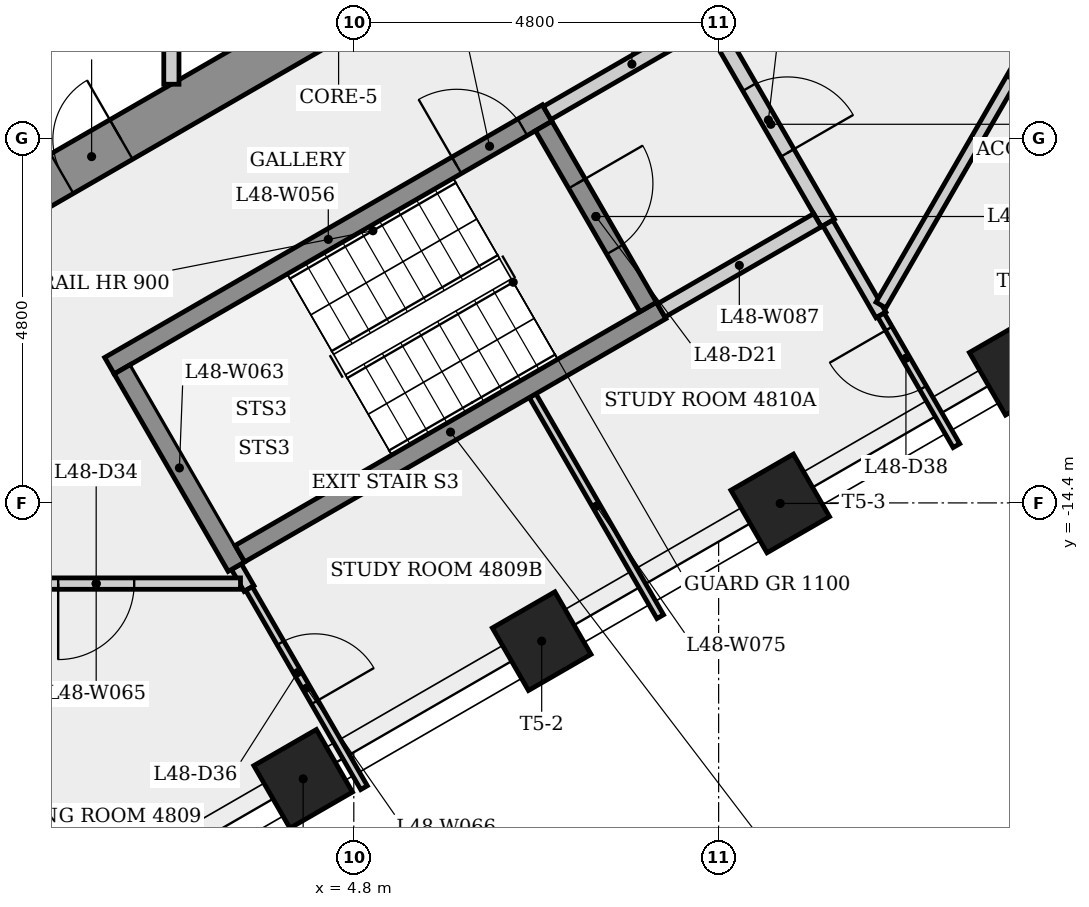
"""IFC4 building model, lengths in metres.
Left out: names, types, materials, properties, quantities, classifications, styles, units other than length and angle.
Written with IfcOpenShell. Run it as: python <this file> out.ifc"""

import sys

from ifc_helpers import new_model, si_unit, direction, frame, frame_2d, origin, origin_2d, place, context, subcontext, project, spatial, rectangle, extrude, element, fill, save


model = new_model("IFC4")
c1 = context("Model", 3, precision=1e-05, world=origin(), true_north=direction((0.0, 1.0)))
c2 = subcontext(c1, "Body", "Model", "MODEL_VIEW")
j1 = project(units=[si_unit("LENGTHUNIT", "METRE"), si_unit("PLANEANGLEUNIT", "RADIAN")], contexts=[c1])
p1 = place(None, origin())
s1 = spatial("IfcSite", under=j1, at=p1, CompositionType="ELEMENT")
p2 = place(p1, origin())
s2 = spatial("IfcBuilding", under=s1, at=p2, CompositionType="ELEMENT")
p3 = place(p2, frame((0.0, 0.0, 179.9)))
s3 = spatial("IfcBuildingStorey", under=s2, at=p3, CompositionType="ELEMENT", Elevation=179.9)
p4 = place(p3, frame((-0.15, -10.71, 0.0), z_axis=(0.0, 0.0, 1.0), x_axis=(0.866023993627, 0.500002442456, 0.0)))
e1 = element("IfcWall", 1, at=p4, inside=s3, PredefinedType="SHEAR", context=c2, shape_type="SweptSolid", body=[
    extrude(rectangle(XDim=10.97, YDim=0.6, at=frame_2d((5.485, 0.0))), origin(), (0.0, 0.0, 1.0), 3.4),
])
p5 = place(p4, frame((1.283, 0.0, 0.0)))
e2 = element("IfcOpeningElement", 2, at=p5, cuts=e1, PredefinedType="OPENING", context=c2, shape_type="SweptSolid", body=[
    extrude(rectangle(XDim=0.9, YDim=2.1, at=frame_2d((0.45, 1.05))), frame((0.0, 0.31, 0.0), z_axis=(0.0, -1.0, 0.0), x_axis=(1.0, 0.0, 0.0)), (0.0, 0.0, 1.0), 0.62),
])
p6 = place(p4, frame((8.09, 0.0, 0.0)))
e3 = element("IfcOpeningElement", 3, at=p6, cuts=e1, PredefinedType="OPENING", context=c2, shape_type="SweptSolid", body=[
    extrude(rectangle(XDim=0.9, YDim=2.1, at=frame_2d((0.45, 1.05))), frame((0.0, 0.31, 0.0), z_axis=(0.0, -1.0, 0.0), x_axis=(1.0, 0.0, 0.0)), (0.0, 0.0, 1.0), 0.62),
])
for number, where, z_axis, x_axis in (
    (4, (4.134, -18.031, 0.0), (0.0, 0.0, 1.0), (0.5, -0.866, 0.0)),
    (5, (7.272, -16.219, 0.0), (0.0, 0.0, 1.0), (0.5, -0.866, 0.0)),
    (6, (10.41, -14.407, 0.0), (0.0, 0.0, 1.0), (0.5, -0.866, 0.0)),
    (7, (13.548, -12.595, 0.0), (0.0, 0.0, 1.0), (0.5, -0.866, 0.0)),
):
    element("IfcColumn", number, at=place(p3, frame(where, z_axis=z_axis, x_axis=x_axis)), inside=s3, PredefinedType="COLUMN", context=c2, shape_type="SweptSolid", body=[
        extrude(rectangle(XDim=0.95, YDim=0.95, at=origin_2d()), origin(), (0.0, 0.0, 1.0), 3.4),
    ])
p7 = place(p3, frame((1.585, -12.595, 0.0), z_axis=(0.0, 0.0, 1.0), x_axis=(0.866036417653, 0.499980922934, 0.0)))
e8 = element("IfcWall", 8, at=p7, inside=s3, PredefinedType="SHEAR", context=c2, shape_type="SweptSolid", body=[
    extrude(rectangle(XDim=6.65, YDim=0.25, at=frame_2d((3.325, 0.0))), origin(), (0.0, 0.0, 1.0), 3.05),
])
p8 = place(p7, frame((5.275, 0.0, 0.0)))
e9 = element("IfcOpeningElement", 9, at=p8, cuts=e8, PredefinedType="OPENING", context=c2, shape_type="SweptSolid", body=[
    extrude(rectangle(XDim=1.0, YDim=2.1, at=frame_2d((0.5, 1.05))), frame((0.0, 0.135, 0.0), z_axis=(0.0, -1.0, 0.0), x_axis=(1.0, 0.0, 0.0)), (0.0, 0.0, 1.0), 0.27),
])
p9 = place(p3, frame((2.4, -5.25, 0.0), z_axis=(0.0, 0.0, 1.0), x_axis=(0.0, -1.0, 0.0)))
e10 = element("IfcWall", 10, at=p9, inside=s3, PredefinedType="PARTITIONING", context=c2, shape_type="SweptSolid", body=[
    extrude(rectangle(XDim=3.641, YDim=0.2, at=frame_2d((1.821, 0.0))), origin(), (0.0, 0.0, 1.0), 3.05),
])
p10 = place(p3, frame((3.256, -15.239, 0.0), z_axis=(0.0, 0.0, 1.0), x_axis=(0.500167465571, -0.865928695901, 0.0)))
e11 = element("IfcWall", 11, at=p10, inside=s3, PredefinedType="PARTITIONING", context=c2, shape_type="SweptSolid", body=[
    extrude(rectangle(XDim=0.333, YDim=0.15, at=frame_2d((0.166, 0.0))), origin(), (0.0, 0.0, 1.0), 3.05),
])
p11 = place(p3, frame((3.256, -15.239, 0.0), z_axis=(0.0, 0.0, 1.0), x_axis=(-0.50002537861, 0.866010750942, 0.0)))
e12 = element("IfcWall", 12, at=p11, inside=s3, PredefinedType="SHEAR", context=c2, shape_type="SweptSolid", body=[
    extrude(rectangle(XDim=3.0, YDim=0.25, at=frame_2d((1.5, 0.0))), origin(), (0.0, 0.0, 1.0), 3.05),
])
p12 = place(p3, frame((3.309, -15.462, 0.0), z_axis=(0.0, 0.0, 1.0), x_axis=(-1.0, 0.0, 0.0)))
e13 = element("IfcWall", 13, at=p12, inside=s3, PredefinedType="PARTITIONING", context=c2, shape_type="SweptSolid", body=[
    extrude(rectangle(XDim=3.797, YDim=0.15, at=frame_2d((1.899, 0.0))), origin(), (0.0, 0.0, 1.0), 3.05),
])
p13 = place(p12, frame((1.399, 0.0, 0.0)))
e14 = element("IfcOpeningElement", 14, at=p13, cuts=e13, PredefinedType="OPENING", context=c2, shape_type="SweptSolid", body=[
    extrude(rectangle(XDim=1.0, YDim=2.1, at=frame_2d((0.5, 1.05))), frame((0.0, 0.085, 0.0), z_axis=(0.0, -1.0, 0.0), x_axis=(1.0, 0.0, 0.0)), (0.0, 0.0, 1.0), 0.17),
])
p14 = place(p3, frame((3.422, -15.527, 0.0), z_axis=(0.0, 0.0, 1.0), x_axis=(0.49999255039, -0.866029704776, 0.0)))
e15 = element("IfcWall", 15, at=p14, inside=s3, PredefinedType="PARTITIONING", context=c2, shape_type="SweptSolid", body=[
    extrude(rectangle(XDim=3.025, YDim=0.1, at=frame_2d((1.513, 0.0))), origin(), (0.0, 0.0, 1.0), 3.05),
])
p15 = place(p14, frame((0.827, 0.0, 0.0)))
e16 = element("IfcOpeningElement", 16, at=p15, cuts=e15, PredefinedType="OPENING", context=c2, shape_type="SweptSolid", body=[
    extrude(rectangle(XDim=0.9, YDim=2.1, at=frame_2d((0.45, 1.05))), frame((0.0, 0.06, 0.0), z_axis=(0.0, -1.0, 0.0), x_axis=(1.0, 0.0, 0.0)), (0.0, 0.0, 1.0), 0.12),
])
p16 = place(p3, frame((7.153, -12.989, 0.0), z_axis=(0.0, 0.0, 1.0), x_axis=(0.500009866947, -0.866019707025, 0.0)))
e17 = element("IfcWall", 17, at=p16, inside=s3, PredefinedType="PARTITIONING", context=c2, shape_type="SweptSolid", body=[
    extrude(rectangle(XDim=3.358, YDim=0.1, at=frame_2d((1.679, 0.0))), origin(), (0.0, 0.0, 1.0), 3.05),
])
p17 = place(p3, frame((3.301, -15.068, 0.0), z_axis=(0.0, 0.0, 1.0), x_axis=(0.866035036182, 0.499983315828, 0.0)))
e18 = element("IfcWall", 18, at=p17, inside=s3, PredefinedType="SHEAR", context=c2, shape_type="SweptSolid", body=[
    extrude(rectangle(XDim=6.4, YDim=0.25, at=frame_2d((3.2, 0.0))), origin(), (0.0, 0.0, 1.0), 3.05),
])
p18 = place(p3, frame((7.298, -9.441, 0.0), z_axis=(0.0, 0.0, 1.0), x_axis=(0.500034990121, -0.866005201286, 0.0)))
e19 = element("IfcWall", 19, at=p18, inside=s3, PredefinedType="SHEAR", context=c2, shape_type="SweptSolid", body=[
    extrude(rectangle(XDim=2.75, YDim=0.25, at=frame_2d((1.375, 0.0))), origin(), (0.0, 0.0, 1.0), 3.05),
])
p19 = place(p18, frame((0.875, 0.0, 0.0)))
e20 = element("IfcOpeningElement", 20, at=p19, cuts=e19, PredefinedType="OPENING", context=c2, shape_type="SweptSolid", body=[
    extrude(rectangle(XDim=1.0, YDim=2.1, at=frame_2d((0.5, 1.05))), frame((0.0, 0.135, 0.0), z_axis=(0.0, -1.0, 0.0), x_axis=(1.0, 0.0, 0.0)), (0.0, 0.0, 1.0), 0.27),
])
p20 = place(p3, frame((7.344, -9.27, 0.0), z_axis=(0.0, 0.0, 1.0), x_axis=(0.866005588531, 0.500034319456, 0.0)))
e21 = element("IfcWall", 21, at=p20, inside=s3, PredefinedType="PARTITIONING", context=c2, shape_type="SweptSolid", body=[
    extrude(rectangle(XDim=2.575, YDim=0.2, at=frame_2d((1.288, 0.0))), origin(), (0.0, 0.0, 1.0), 3.05),
])
p21 = place(p3, frame((9.537, -8.119, 0.0), z_axis=(0.0, 0.0, 1.0), x_axis=(0.499990139034, -0.866031096941, 0.0)))
e22 = element("IfcWall", 22, at=p21, inside=s3, PredefinedType="PARTITIONING", context=c2, shape_type="SweptSolid", body=[
    extrude(rectangle(XDim=3.0, YDim=0.2, at=frame_2d((1.5, 0.0))), origin(), (0.0, 0.0, 1.0), 3.05),
])
p22 = place(p21, frame((0.935, 0.0, 0.0)))
e23 = element("IfcOpeningElement", 23, at=p22, cuts=e22, PredefinedType="OPENING", context=c2, shape_type="SweptSolid", body=[
    extrude(rectangle(XDim=1.0, YDim=2.1, at=frame_2d((0.5, 1.05))), frame((0.0, 0.11, 0.0), z_axis=(0.0, -1.0, 0.0), x_axis=(1.0, 0.0, 0.0)), (0.0, 0.0, 1.0), 0.22),
])
p23 = place(p3, frame((10.901, -10.681, 0.0), z_axis=(0.0, 0.0, 1.0), x_axis=(-0.866007538022, -0.500030943131, 0.0)))
e24 = element("IfcWall", 24, at=p23, inside=s3, PredefinedType="PARTITIONING", context=c2, shape_type="SweptSolid", body=[
    extrude(rectangle(XDim=2.375, YDim=0.2, at=frame_2d((1.188, 0.0))), origin(), (0.0, 0.0, 1.0), 3.05),
])
p24 = place(p3, frame((11.736, -11.927, 0.0), z_axis=(0.0, 0.0, 1.0), x_axis=(-0.499898978922, 0.866083720475, 0.0)))
e25 = element("IfcWall", 25, at=p24, inside=s3, PredefinedType="PARTITIONING", context=c2, shape_type="SweptSolid", body=[
    extrude(rectangle(XDim=1.397, YDim=0.15, at=frame_2d((0.698, 0.0))), origin(), (0.0, 0.0, 1.0), 3.05),
])
p25 = place(p3, frame((12.729, -13.647, 0.0), z_axis=(0.0, 0.0, 1.0), x_axis=(-0.50005230485, 0.865995203459, 0.0)))
e26 = element("IfcWall", 26, at=p25, inside=s3, PredefinedType="PARTITIONING", context=c2, shape_type="SweptSolid", body=[
    extrude(rectangle(XDim=1.986, YDim=0.1, at=frame_2d((0.993, 0.0))), origin(), (0.0, 0.0, 1.0), 3.05),
])
p26 = place(p25, frame((0.878, 0.0, 0.0)))
e27 = element("IfcOpeningElement", 27, at=p26, cuts=e26, PredefinedType="OPENING", context=c2, shape_type="SweptSolid", body=[
    extrude(rectangle(XDim=0.9, YDim=2.1, at=frame_2d((0.45, 1.05))), frame((0.0, 0.06, 0.0), z_axis=(0.0, -1.0, 0.0), x_axis=(1.0, 0.0, 0.0)), (0.0, 0.0, 1.0), 0.12),
])
p27 = place(p3, frame((15.662, -4.997, 0.0), z_axis=(0.0, 0.0, 1.0), x_axis=(-0.500001468015, -0.866024556224, 0.0)))
e28 = element("IfcWall", 28, at=p27, inside=s3, PredefinedType="PARTITIONING", context=c2, shape_type="SweptSolid", body=[
    extrude(rectangle(XDim=7.852, YDim=0.15, at=frame_2d((3.926, 0.0))), origin(), (0.0, 0.0, 1.0), 3.05),
])
p28 = place(p27, frame((3.426, 0.0, 0.0)))
e29 = element("IfcOpeningElement", 29, at=p28, cuts=e28, PredefinedType="OPENING", context=c2, shape_type="SweptSolid", body=[
    extrude(rectangle(XDim=1.0, YDim=2.1, at=frame_2d((0.5, 1.05))), frame((0.0, 0.085, 0.0), z_axis=(0.0, -1.0, 0.0), x_axis=(1.0, 0.0, 0.0)), (0.0, 0.0, 1.0), 0.17),
])
p29 = place(p8, origin())
e30 = element("IfcDoor", 30, at=p29, inside=s3, OperationType="SINGLE_SWING_LEFT", PredefinedType="DOOR", context=c2, shape_type="SweptSolid", body=[
    extrude(rectangle(XDim=1.0, YDim=2.1, at=frame_2d((0.5, 1.05))), frame((0.0, 0.025, 0.0), z_axis=(0.0, -1.0, 0.0), x_axis=(1.0, 0.0, 0.0)), (0.0, 0.0, 1.0), 0.05),
])
fill(e9, e30)
p30 = place(p22, origin())
e31 = element("IfcDoor", 31, at=p30, inside=s3, OperationType="SINGLE_SWING_RIGHT", PredefinedType="DOOR", context=c2, shape_type="SweptSolid", body=[
    extrude(rectangle(XDim=1.0, YDim=2.1, at=frame_2d((0.5, 1.05))), frame((0.0, 0.025, 0.0), z_axis=(0.0, -1.0, 0.0), x_axis=(1.0, 0.0, 0.0)), (0.0, 0.0, 1.0), 0.05),
])
fill(e23, e31)
p31 = place(p19, origin())
e32 = element("IfcDoor", 32, at=p31, inside=s3, OperationType="SINGLE_SWING_LEFT", PredefinedType="DOOR", context=c2, shape_type="SweptSolid", body=[
    extrude(rectangle(XDim=1.0, YDim=2.1, at=frame_2d((0.5, 1.05))), frame((0.0, 0.025, 0.0), z_axis=(0.0, -1.0, 0.0), x_axis=(1.0, 0.0, 0.0)), (0.0, 0.0, 1.0), 0.05),
])
fill(e20, e32)
p32 = place(p13, origin())
e33 = element("IfcDoor", 33, at=p32, inside=s3, OperationType="SINGLE_SWING_RIGHT", PredefinedType="DOOR", context=c2, shape_type="SweptSolid", body=[
    extrude(rectangle(XDim=1.0, YDim=2.1, at=frame_2d((0.5, 1.05))), frame((0.0, 0.025, 0.0), z_axis=(0.0, -1.0, 0.0), x_axis=(1.0, 0.0, 0.0)), (0.0, 0.0, 1.0), 0.05),
])
fill(e14, e33)
p33 = place(p15, origin())
e34 = element("IfcDoor", 34, at=p33, inside=s3, OperationType="SINGLE_SWING_RIGHT", PredefinedType="DOOR", context=c2, shape_type="SweptSolid", body=[
    extrude(rectangle(XDim=0.9, YDim=2.1, at=frame_2d((0.45, 1.05))), frame((0.0, 0.025, 0.0), z_axis=(0.0, -1.0, 0.0), x_axis=(1.0, 0.0, 0.0)), (0.0, 0.0, 1.0), 0.05),
])
fill(e16, e34)
p34 = place(p26, origin())
e35 = element("IfcDoor", 35, at=p34, inside=s3, OperationType="SINGLE_SWING_RIGHT", PredefinedType="DOOR", context=c2, shape_type="SweptSolid", body=[
    extrude(rectangle(XDim=0.9, YDim=2.1, at=frame_2d((0.45, 1.05))), frame((0.0, 0.025, 0.0), z_axis=(0.0, -1.0, 0.0), x_axis=(1.0, 0.0, 0.0)), (0.0, 0.0, 1.0), 0.05),
])
fill(e27, e35)
p35 = place(p5, origin())
e36 = element("IfcDoor", 36, at=p35, inside=s3, OperationType="SINGLE_SWING_RIGHT", PredefinedType="DOOR", context=c2, shape_type="SweptSolid", body=[
    extrude(rectangle(XDim=0.9, YDim=2.1, at=frame_2d((0.45, 1.05))), frame((0.0, 0.025, 0.0), z_axis=(0.0, -1.0, 0.0), x_axis=(1.0, 0.0, 0.0)), (0.0, 0.0, 1.0), 0.05),
])
fill(e2, e36)
save(model, sys.argv[1])
